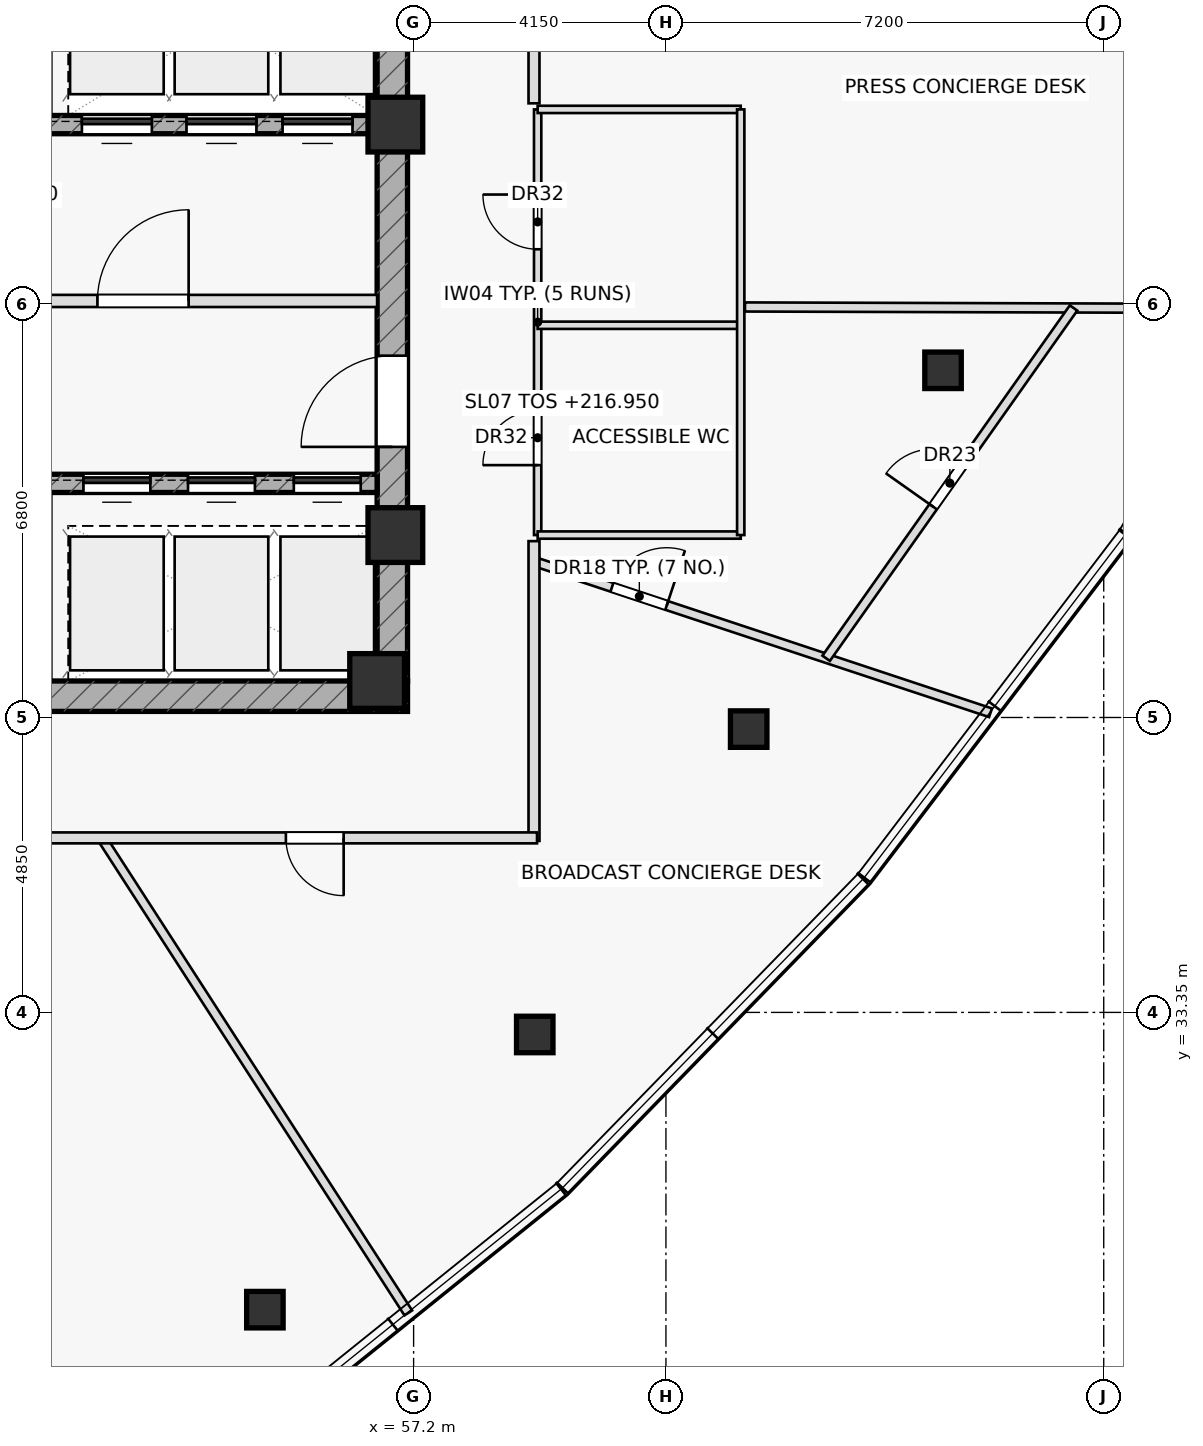
"""IFC4 building model, lengths in metres.
Left out: names, types, materials, properties, quantities, classifications, styles, units other than length and angle.
Written with IfcOpenShell. Run it as: python <this file> out.ifc"""

import sys

from ifc_helpers import new_model, si_unit, direction, frame, frame_2d, origin, origin_2d, place, context, subcontext, project, spatial, rectangle, hollow_rectangle, extrude, element, fill, save


model = new_model("IFC4")
c1 = context("Model", 3, precision=1e-05, world=origin(), true_north=direction((0.0, 1.0)))
c2 = subcontext(c1, "Body", "Model", "MODEL_VIEW")
j1 = project(units=[si_unit("LENGTHUNIT", "METRE"), si_unit("PLANEANGLEUNIT", "RADIAN")], contexts=[c1])
p1 = place(None, origin())
s1 = spatial("IfcSite", under=j1, at=p1, CompositionType="ELEMENT")
p2 = place(p1, origin())
s2 = spatial("IfcBuilding", under=s1, at=p2, CompositionType="ELEMENT")
p3 = place(p2, frame((0.0, 0.0, 216.95)))
s3 = spatial("IfcBuildingStorey", under=s2, at=p3, CompositionType="ELEMENT", Elevation=216.95)
p4 = place(p3, frame((42.9, 38.55, 0.0), z_axis=(0.0, 0.0, 1.0), x_axis=(1.0, 0.0, 0.0)))
e1 = element("IfcWall", 1, at=p4, inside=s3, PredefinedType="SHEAR", context=c2, shape_type="SweptSolid", body=[
    extrude(rectangle(XDim=14.2, YDim=0.5, at=frame_2d((7.1, 0.0))), origin(), (0.0, 0.0, 1.0), 4.9),
])
p5 = place(p4, frame((0.78, 0.0, 0.0)))
e2 = element("IfcOpeningElement", 2, at=p5, cuts=e1, PredefinedType="OPENING", context=c2, shape_type="SweptSolid", body=[
    extrude(rectangle(XDim=1.05, YDim=2.2, at=frame_2d((0.525, 1.1))), frame((0.0, 0.26, 0.0), z_axis=(0.0, -1.0, 0.0), x_axis=(1.0, 0.0, 0.0)), (0.0, 0.0, 1.0), 0.52),
])
p6 = place(p3, frame((56.85, 38.8, 0.0), z_axis=(0.0, 0.0, 1.0), x_axis=(0.0, 1.0, 0.0)))
e3 = element("IfcWall", 3, at=p6, inside=s3, PredefinedType="SHEAR", context=c2, shape_type="SweptSolid", body=[
    extrude(rectangle(XDim=12.4, YDim=0.5, at=frame_2d((6.2, 0.0))), origin(), (0.0, 0.0, 1.0), 4.9),
])
p7 = place(p6, frame((3.85, 0.0, 0.0)))
e4 = element("IfcOpeningElement", 4, at=p7, cuts=e3, PredefinedType="OPENING", context=c2, shape_type="SweptSolid", body=[
    extrude(rectangle(XDim=1.5, YDim=2.2, at=frame_2d((0.75, 1.1))), frame((0.0, 0.26, 0.0), z_axis=(0.0, -1.0, 0.0), x_axis=(1.0, 0.0, 0.0)), (0.0, 0.0, 1.0), 0.52),
])
p8 = place(p3, frame((43.4, 47.95, 0.0), z_axis=(0.0, 0.0, 1.0), x_axis=(1.0, 0.0, 0.0)))
e5 = element("IfcWall", 5, at=p8, inside=s3, PredefinedType="SHEAR", context=c2, shape_type="SweptSolid", body=[
    extrude(rectangle(XDim=13.2, YDim=0.3, at=frame_2d((6.6, 0.0))), origin(), (0.0, 0.0, 1.0), 4.9),
])
p9 = place(p8, frame((8.345, 0.0, 0.0)))
e6 = element("IfcOpeningElement", 6, at=p9, cuts=e5, PredefinedType="OPENING", context=c2, shape_type="SweptSolid", body=[
    extrude(rectangle(XDim=1.15, YDim=2.2, at=frame_2d((0.575, 1.1))), frame((0.0, 0.16, 0.0), z_axis=(0.0, -1.0, 0.0), x_axis=(1.0, 0.0, 0.0)), (0.0, 0.0, 1.0), 0.32),
])
p10 = place(p8, frame((10.065, 0.0, 0.0)))
e7 = element("IfcOpeningElement", 7, at=p10, cuts=e5, PredefinedType="OPENING", context=c2, shape_type="SweptSolid", body=[
    extrude(rectangle(XDim=1.15, YDim=2.2, at=frame_2d((0.575, 1.1))), frame((0.0, 0.16, 0.0), z_axis=(0.0, -1.0, 0.0), x_axis=(1.0, 0.0, 0.0)), (0.0, 0.0, 1.0), 0.32),
])
p11 = place(p8, frame((11.645, 0.0, 0.0)))
e8 = element("IfcOpeningElement", 8, at=p11, cuts=e5, PredefinedType="OPENING", context=c2, shape_type="SweptSolid", body=[
    extrude(rectangle(XDim=1.15, YDim=2.2, at=frame_2d((0.575, 1.1))), frame((0.0, 0.16, 0.0), z_axis=(0.0, -1.0, 0.0), x_axis=(1.0, 0.0, 0.0)), (0.0, 0.0, 1.0), 0.32),
])
p12 = place(p3, frame((43.4, 42.05, 0.0), z_axis=(0.0, 0.0, 1.0), x_axis=(1.0, 0.0, 0.0)))
e9 = element("IfcWall", 9, at=p12, inside=s3, PredefinedType="SHEAR", context=c2, shape_type="SweptSolid", body=[
    extrude(rectangle(XDim=13.2, YDim=0.3, at=frame_2d((6.6, 0.0))), origin(), (0.0, 0.0, 1.0), 4.9),
])
p13 = place(p12, frame((8.37, 0.0, 0.0)))
e10 = element("IfcOpeningElement", 10, at=p13, cuts=e9, PredefinedType="OPENING", context=c2, shape_type="SweptSolid", body=[
    extrude(rectangle(XDim=1.1, YDim=2.15, at=frame_2d((0.55, 1.075))), frame((0.0, 0.16, 0.0), z_axis=(0.0, -1.0, 0.0), x_axis=(1.0, 0.0, 0.0)), (0.0, 0.0, 1.0), 0.32),
])
p14 = place(p12, frame((10.09, 0.0, 0.0)))
e11 = element("IfcOpeningElement", 11, at=p14, cuts=e9, PredefinedType="OPENING", context=c2, shape_type="SweptSolid", body=[
    extrude(rectangle(XDim=1.1, YDim=2.15, at=frame_2d((0.55, 1.075))), frame((0.0, 0.16, 0.0), z_axis=(0.0, -1.0, 0.0), x_axis=(1.0, 0.0, 0.0)), (0.0, 0.0, 1.0), 0.32),
])
p15 = place(p12, frame((11.83, 0.0, 0.0)))
e12 = element("IfcOpeningElement", 12, at=p15, cuts=e9, PredefinedType="OPENING", context=c2, shape_type="SweptSolid", body=[
    extrude(rectangle(XDim=1.1, YDim=2.15, at=frame_2d((0.55, 1.075))), frame((0.0, 0.16, 0.0), z_axis=(0.0, -1.0, 0.0), x_axis=(1.0, 0.0, 0.0)), (0.0, 0.0, 1.0), 0.32),
])
for number, where, z_axis, x_axis in (
    (13, (56.9, 47.95, 0.0), (0.0, 0.0, 1.0), (1.0, 0.0, 0.0)),
    (14, (56.9, 41.2, 0.0), (0.0, 0.0, 1.0), (1.0, 0.0, 0.0)),
    (15, (56.6, 38.8, 0.0), (0.0, 0.0, 1.0), (1.0, 0.0, 0.0)),
):
    element("IfcColumn", number, at=place(p3, frame(where, z_axis=z_axis, x_axis=x_axis)), inside=s3, PredefinedType="COLUMN", context=c2, shape_type="SweptSolid", body=[
        extrude(rectangle(XDim=0.9, YDim=0.9, at=origin_2d()), origin(), (0.0, 0.0, 1.0), 4.9),
    ])
for number, where, z_axis, x_axis in (
    (16, (54.754, 28.462, 0.0), (0.0, 0.0, 1.0), (1.0, 0.0, 0.0)),
    (17, (59.192, 32.987, 0.0), (0.0, 0.0, 1.0), (1.0, 0.0, 0.0)),
    (18, (62.711, 38.009, 0.0), (0.0, 0.0, 1.0), (1.0, 0.0, 0.0)),
    (19, (65.907, 43.909, 0.0), (0.0, 0.0, 1.0), (1.0, 0.0, 0.0)),
):
    element("IfcColumn", number, at=place(p3, frame(where, z_axis=z_axis, x_axis=x_axis)), inside=s3, PredefinedType="COLUMN", context=c2, shape_type="SweptSolid", body=[
        extrude(hollow_rectangle(XDim=0.6, YDim=0.6, WallThickness=0.036, at=origin_2d()), origin(), (0.0, 0.0, 1.0), 4.9),
    ])
p16 = place(p3, frame((50.65, 45.05, 0.0), z_axis=(0.0, 0.0, 1.0), x_axis=(1.0, 0.0, 0.0)))
e20 = element("IfcWall", 20, at=p16, inside=s3, PredefinedType="PARTITIONING", context=c2, shape_type="SweptSolid", body=[
    extrude(rectangle(XDim=5.95, YDim=0.2, at=frame_2d((2.975, 0.0))), origin(), (0.0, 0.0, 1.0), 4.9),
])
p17 = place(p16, frame((1.35, 0.0, 0.0)))
e21 = element("IfcOpeningElement", 21, at=p17, cuts=e20, PredefinedType="OPENING", context=c2, shape_type="SweptSolid", body=[
    extrude(rectangle(XDim=1.5, YDim=2.2, at=frame_2d((0.75, 1.1))), frame((0.0, 0.11, 0.0), z_axis=(0.0, -1.0, 0.0), x_axis=(1.0, 0.0, 0.0)), (0.0, 0.0, 1.0), 0.22),
])
p18 = place(p3, frame((59.24, 41.2, 0.0), z_axis=(0.0, 0.0, 1.0), x_axis=(0.0, 1.0, 0.0)))
e22 = element("IfcWall", 22, at=p18, inside=s3, PredefinedType="PARTITIONING", context=c2, shape_type="SweptSolid", body=[
    extrude(rectangle(XDim=7.0, YDim=0.12, at=frame_2d((3.5, 0.0))), origin(), (0.0, 0.0, 1.0), 4.9),
])
p19 = place(p18, frame((1.15, 0.0, 0.0)))
e23 = element("IfcOpeningElement", 23, at=p19, cuts=e22, PredefinedType="OPENING", context=c2, shape_type="SweptSolid", body=[
    extrude(rectangle(XDim=0.9, YDim=2.05, at=frame_2d((0.45, 1.025))), frame((0.0, 0.07, 0.0), z_axis=(0.0, -1.0, 0.0), x_axis=(1.0, 0.0, 0.0)), (0.0, 0.0, 1.0), 0.14),
])
p20 = place(p18, frame((4.7, 0.0, 0.0)))
e24 = element("IfcOpeningElement", 24, at=p20, cuts=e22, PredefinedType="OPENING", context=c2, shape_type="SweptSolid", body=[
    extrude(rectangle(XDim=0.9, YDim=2.05, at=frame_2d((0.45, 1.025))), frame((0.0, 0.07, 0.0), z_axis=(0.0, -1.0, 0.0), x_axis=(1.0, 0.0, 0.0)), (0.0, 0.0, 1.0), 0.14),
])
p21 = place(p3, frame((59.24, 41.2, 0.0), z_axis=(0.0, 0.0, 1.0), x_axis=(1.0, 0.0, 0.0)))
e25 = element("IfcWall", 25, at=p21, inside=s3, PredefinedType="PARTITIONING", context=c2, shape_type="SweptSolid", body=[
    extrude(rectangle(XDim=3.34, YDim=0.12, at=frame_2d((1.67, 0.0))), origin(), (0.0, 0.0, 1.0), 4.275),
])
for number, where, z_axis, x_axis in (
    (26, (59.24, 44.65, 0.0), (0.0, 0.0, 1.0), (1.0, 0.0, 0.0)),
    (27, (59.24, 48.2, 0.0), (0.0, 0.0, 1.0), (1.0, 0.0, 0.0)),
):
    element("IfcWall", number, at=place(p3, frame(where, z_axis=z_axis, x_axis=x_axis)), inside=s3, PredefinedType="PARTITIONING", context=c2, shape_type="SweptSolid", body=[
        extrude(rectangle(XDim=3.34, YDim=0.12, at=frame_2d((1.67, 0.0))), origin(), (0.0, 0.0, 1.0), 4.9),
    ])
p22 = place(p3, frame((62.58, 41.2, 0.0), z_axis=(0.0, 0.0, 1.0), x_axis=(0.0, 1.0, 0.0)))
e28 = element("IfcWall", 28, at=p22, inside=s3, PredefinedType="PARTITIONING", context=c2, shape_type="SweptSolid", body=[
    extrude(rectangle(XDim=7.0, YDim=0.12, at=frame_2d((3.5, 0.0))), origin(), (0.0, 0.0, 1.0), 4.575),
])
p23 = place(p3, frame((52.069, 36.22, 0.0), z_axis=(0.0, 0.0, 1.0), x_axis=(0.542431242732, -0.840100200516, 0.0)))
e29 = element("IfcWall", 29, at=p23, inside=s3, PredefinedType="PARTITIONING", context=c2, shape_type="SweptSolid", body=[
    extrude(rectangle(XDim=9.298, YDim=0.15, at=frame_2d((4.649, 0.0))), origin(), (0.0, 0.0, 1.0), 4.275),
])
p24 = place(p3, frame((59.18, 40.766, 0.0), z_axis=(0.0, 0.0, 1.0), x_axis=(0.949255862532, -0.314504860772, 0.0)))
e30 = element("IfcWall", 30, at=p24, inside=s3, PredefinedType="PARTITIONING", context=c2, shape_type="SweptSolid", body=[
    extrude(rectangle(XDim=7.909, YDim=0.15, at=frame_2d((3.955, 0.0))), origin(), (0.0, 0.0, 1.0), 4.275),
])
p25 = place(p24, frame((1.35, 0.0, 0.0)))
e31 = element("IfcOpeningElement", 31, at=p25, cuts=e30, PredefinedType="OPENING", context=c2, shape_type="SweptSolid", body=[
    extrude(rectangle(XDim=0.95, YDim=2.05, at=frame_2d((0.475, 1.025))), frame((0.0, 0.085, 0.0), z_axis=(0.0, -1.0, 0.0), x_axis=(1.0, 0.0, 0.0)), (0.0, 0.0, 1.0), 0.17),
])
p26 = place(p3, frame((62.65, 44.951, 0.0), z_axis=(0.0, 0.0, 1.0), x_axis=(0.999995390856, -0.003036159848, 0.0)))
e32 = element("IfcWall", 32, at=p26, inside=s3, PredefinedType="PARTITIONING", context=c2, shape_type="SweptSolid", body=[
    extrude(rectangle(XDim=8.443, YDim=0.15, at=frame_2d((4.222, 0.0))), origin(), (0.0, 0.0, 1.0), 4.385),
])
p27 = place(p3, frame((63.985, 39.174, 0.0), z_axis=(0.0, 0.0, 1.0), x_axis=(0.576874808599, 0.816832574769, 0.0)))
e33 = element("IfcWall", 33, at=p27, inside=s3, PredefinedType="PARTITIONING", context=c2, shape_type="SweptSolid", body=[
    extrude(rectangle(XDim=7.053, YDim=0.15, at=frame_2d((3.526, 0.0))), origin(), (0.0, 0.0, 1.0), 4.9),
])
p28 = place(p27, frame((3.052, 0.0, 0.0)))
e34 = element("IfcOpeningElement", 34, at=p28, cuts=e33, PredefinedType="OPENING", context=c2, shape_type="SweptSolid", body=[
    extrude(rectangle(XDim=0.95, YDim=2.05, at=frame_2d((0.475, 1.025))), frame((0.0, 0.085, 0.0), z_axis=(0.0, -1.0, 0.0), x_axis=(1.0, 0.0, 0.0)), (0.0, 0.0, 1.0), 0.17),
])
p29 = place(p3, frame((59.18, 53.83, 0.0), z_axis=(0.0, 0.0, 1.0), x_axis=(0.0, -1.0, 0.0)))
e35 = element("IfcWall", 35, at=p29, inside=s3, PredefinedType="PARTITIONING", context=c2, shape_type="SweptSolid", body=[
    extrude(rectangle(XDim=5.53, YDim=0.18, at=frame_2d((2.765, 0.0))), origin(), (0.0, 0.0, 1.0), 4.9),
])
p30 = place(p29, frame((2.29, 0.0, 0.0)))
e36 = element("IfcOpeningElement", 36, at=p30, cuts=e35, PredefinedType="OPENING", context=c2, shape_type="SweptSolid", body=[
    extrude(rectangle(XDim=0.95, YDim=2.05, at=frame_2d((0.475, 1.025))), frame((0.0, 0.1, 0.0), z_axis=(0.0, -1.0, 0.0), x_axis=(1.0, 0.0, 0.0)), (0.0, 0.0, 1.0), 0.2),
])
p31 = place(p3, frame((59.18, 41.1, 0.0), z_axis=(0.0, 0.0, 1.0), x_axis=(0.0, -1.0, 0.0)))
e37 = element("IfcWall", 37, at=p31, inside=s3, PredefinedType="PARTITIONING", context=c2, shape_type="SweptSolid", body=[
    extrude(rectangle(XDim=4.93, YDim=0.18, at=frame_2d((2.465, 0.0))), origin(), (0.0, 0.0, 1.0), 4.575),
])
p32 = place(p3, frame((59.23, 36.22, 0.0), z_axis=(0.0, 0.0, 1.0), x_axis=(-1.0, 0.0, 0.0)))
e38 = element("IfcWall", 38, at=p32, inside=s3, PredefinedType="PARTITIONING", context=c2, shape_type="SweptSolid", body=[
    extrude(rectangle(XDim=19.48, YDim=0.18, at=frame_2d((9.74, 0.0))), origin(), (0.0, 0.0, 1.0), 4.275),
])
p33 = place(p32, frame((3.18, 0.0, 0.0)))
e39 = element("IfcOpeningElement", 39, at=p33, cuts=e38, PredefinedType="OPENING", context=c2, shape_type="SweptSolid", body=[
    extrude(rectangle(XDim=0.95, YDim=2.05, at=frame_2d((0.475, 1.025))), frame((0.0, 0.1, 0.0), z_axis=(0.0, -1.0, 0.0), x_axis=(1.0, 0.0, 0.0)), (0.0, 0.0, 1.0), 0.2),
])
p34 = place(p32, frame((11.654, 0.0, 0.0)))
e40 = element("IfcOpeningElement", 40, at=p34, cuts=e38, PredefinedType="OPENING", context=c2, shape_type="SweptSolid", body=[
    extrude(rectangle(XDim=0.95, YDim=2.05, at=frame_2d((0.475, 1.025))), frame((0.0, 0.1, 0.0), z_axis=(0.0, -1.0, 0.0), x_axis=(1.0, 0.0, 0.0)), (0.0, 0.0, 1.0), 0.2),
])
p35 = place(p7, origin())
e41 = element("IfcDoor", 41, at=p35, inside=s3, OperationType="SINGLE_SWING_LEFT", PredefinedType="DOOR", context=c2, shape_type="SweptSolid", body=[
    extrude(rectangle(XDim=1.5, YDim=2.2, at=frame_2d((0.75, 1.1))), frame((0.0, 0.025, 0.0), z_axis=(0.0, -1.0, 0.0), x_axis=(1.0, 0.0, 0.0)), (0.0, 0.0, 1.0), 0.05),
])
fill(e4, e41)
p36 = place(p17, origin())
e42 = element("IfcDoor", 42, at=p36, inside=s3, OperationType="SINGLE_SWING_RIGHT", PredefinedType="DOOR", context=c2, shape_type="SweptSolid", body=[
    extrude(rectangle(XDim=1.5, YDim=2.2, at=frame_2d((0.75, 1.1))), frame((0.0, 0.025, 0.0), z_axis=(0.0, -1.0, 0.0), x_axis=(1.0, 0.0, 0.0)), (0.0, 0.0, 1.0), 0.05),
])
fill(e21, e42)
p37 = place(p19, origin())
e43 = element("IfcDoor", 43, at=p37, inside=s3, OperationType="SINGLE_SWING_LEFT", PredefinedType="DOOR", context=c2, shape_type="SweptSolid", body=[
    extrude(rectangle(XDim=0.9, YDim=2.05, at=frame_2d((0.45, 1.025))), frame((0.0, 0.025, 0.0), z_axis=(0.0, -1.0, 0.0), x_axis=(1.0, 0.0, 0.0)), (0.0, 0.0, 1.0), 0.05),
])
fill(e23, e43)
p38 = place(p20, origin())
e44 = element("IfcDoor", 44, at=p38, inside=s3, OperationType="SINGLE_SWING_RIGHT", PredefinedType="DOOR", context=c2, shape_type="SweptSolid", body=[
    extrude(rectangle(XDim=0.9, YDim=2.05, at=frame_2d((0.45, 1.025))), frame((0.0, 0.025, 0.0), z_axis=(0.0, -1.0, 0.0), x_axis=(1.0, 0.0, 0.0)), (0.0, 0.0, 1.0), 0.05),
])
fill(e24, e44)
p39 = place(p25, origin())
e45 = element("IfcDoor", 45, at=p39, inside=s3, OperationType="SINGLE_SWING_RIGHT", PredefinedType="DOOR", context=c2, shape_type="SweptSolid", body=[
    extrude(rectangle(XDim=0.95, YDim=2.05, at=frame_2d((0.475, 1.025))), frame((0.0, 0.025, 0.0), z_axis=(0.0, -1.0, 0.0), x_axis=(1.0, 0.0, 0.0)), (0.0, 0.0, 1.0), 0.05),
])
fill(e31, e45)
p40 = place(p28, origin())
e46 = element("IfcDoor", 46, at=p40, inside=s3, OperationType="SINGLE_SWING_LEFT", PredefinedType="DOOR", context=c2, shape_type="SweptSolid", body=[
    extrude(rectangle(XDim=0.95, YDim=2.05, at=frame_2d((0.475, 1.025))), frame((0.0, 0.025, 0.0), z_axis=(0.0, -1.0, 0.0), x_axis=(1.0, 0.0, 0.0)), (0.0, 0.0, 1.0), 0.05),
])
fill(e34, e46)
p41 = place(p33, origin())
e47 = element("IfcDoor", 47, at=p41, inside=s3, OperationType="SINGLE_SWING_LEFT", PredefinedType="DOOR", context=c2, shape_type="SweptSolid", body=[
    extrude(rectangle(XDim=0.95, YDim=2.05, at=frame_2d((0.475, 1.025))), frame((0.0, 0.025, 0.0), z_axis=(0.0, -1.0, 0.0), x_axis=(1.0, 0.0, 0.0)), (0.0, 0.0, 1.0), 0.05),
])
fill(e39, e47)
p42 = place(p9, origin())
e48 = element("IfcDoor", 48, at=p42, inside=s3, OperationType="SLIDING_TO_LEFT", PredefinedType="DOOR", context=c2, shape_type="SweptSolid", body=[
    extrude(rectangle(XDim=1.15, YDim=2.2, at=frame_2d((0.575, 1.1))), frame((0.0, 0.025, 0.0), z_axis=(0.0, -1.0, 0.0), x_axis=(1.0, 0.0, 0.0)), (0.0, 0.0, 1.0), 0.05),
])
fill(e6, e48)
p43 = place(p10, origin())
e49 = element("IfcDoor", 49, at=p43, inside=s3, OperationType="SLIDING_TO_LEFT", PredefinedType="DOOR", context=c2, shape_type="SweptSolid", body=[
    extrude(rectangle(XDim=1.15, YDim=2.2, at=frame_2d((0.575, 1.1))), frame((0.0, 0.025, 0.0), z_axis=(0.0, -1.0, 0.0), x_axis=(1.0, 0.0, 0.0)), (0.0, 0.0, 1.0), 0.05),
])
fill(e7, e49)
p44 = place(p11, origin())
e50 = element("IfcDoor", 50, at=p44, inside=s3, OperationType="SLIDING_TO_LEFT", PredefinedType="DOOR", context=c2, shape_type="SweptSolid", body=[
    extrude(rectangle(XDim=1.15, YDim=2.2, at=frame_2d((0.575, 1.1))), frame((0.0, 0.025, 0.0), z_axis=(0.0, -1.0, 0.0), x_axis=(1.0, 0.0, 0.0)), (0.0, 0.0, 1.0), 0.05),
])
fill(e8, e50)
p45 = place(p13, origin())
e51 = element("IfcDoor", 51, at=p45, inside=s3, OperationType="SLIDING_TO_LEFT", PredefinedType="DOOR", context=c2, shape_type="SweptSolid", body=[
    extrude(rectangle(XDim=1.1, YDim=2.15, at=frame_2d((0.55, 1.075))), frame((0.0, 0.025, 0.0), z_axis=(0.0, -1.0, 0.0), x_axis=(1.0, 0.0, 0.0)), (0.0, 0.0, 1.0), 0.05),
])
fill(e10, e51)
p46 = place(p14, origin())
e52 = element("IfcDoor", 52, at=p46, inside=s3, OperationType="SLIDING_TO_LEFT", PredefinedType="DOOR", context=c2, shape_type="SweptSolid", body=[
    extrude(rectangle(XDim=1.1, YDim=2.15, at=frame_2d((0.55, 1.075))), frame((0.0, 0.025, 0.0), z_axis=(0.0, -1.0, 0.0), x_axis=(1.0, 0.0, 0.0)), (0.0, 0.0, 1.0), 0.05),
])
fill(e11, e52)
p47 = place(p15, origin())
e53 = element("IfcDoor", 53, at=p47, inside=s3, OperationType="SLIDING_TO_LEFT", PredefinedType="DOOR", context=c2, shape_type="SweptSolid", body=[
    extrude(rectangle(XDim=1.1, YDim=2.15, at=frame_2d((0.55, 1.075))), frame((0.0, 0.025, 0.0), z_axis=(0.0, -1.0, 0.0), x_axis=(1.0, 0.0, 0.0)), (0.0, 0.0, 1.0), 0.05),
])
fill(e12, e53)
save(model, sys.argv[1])
